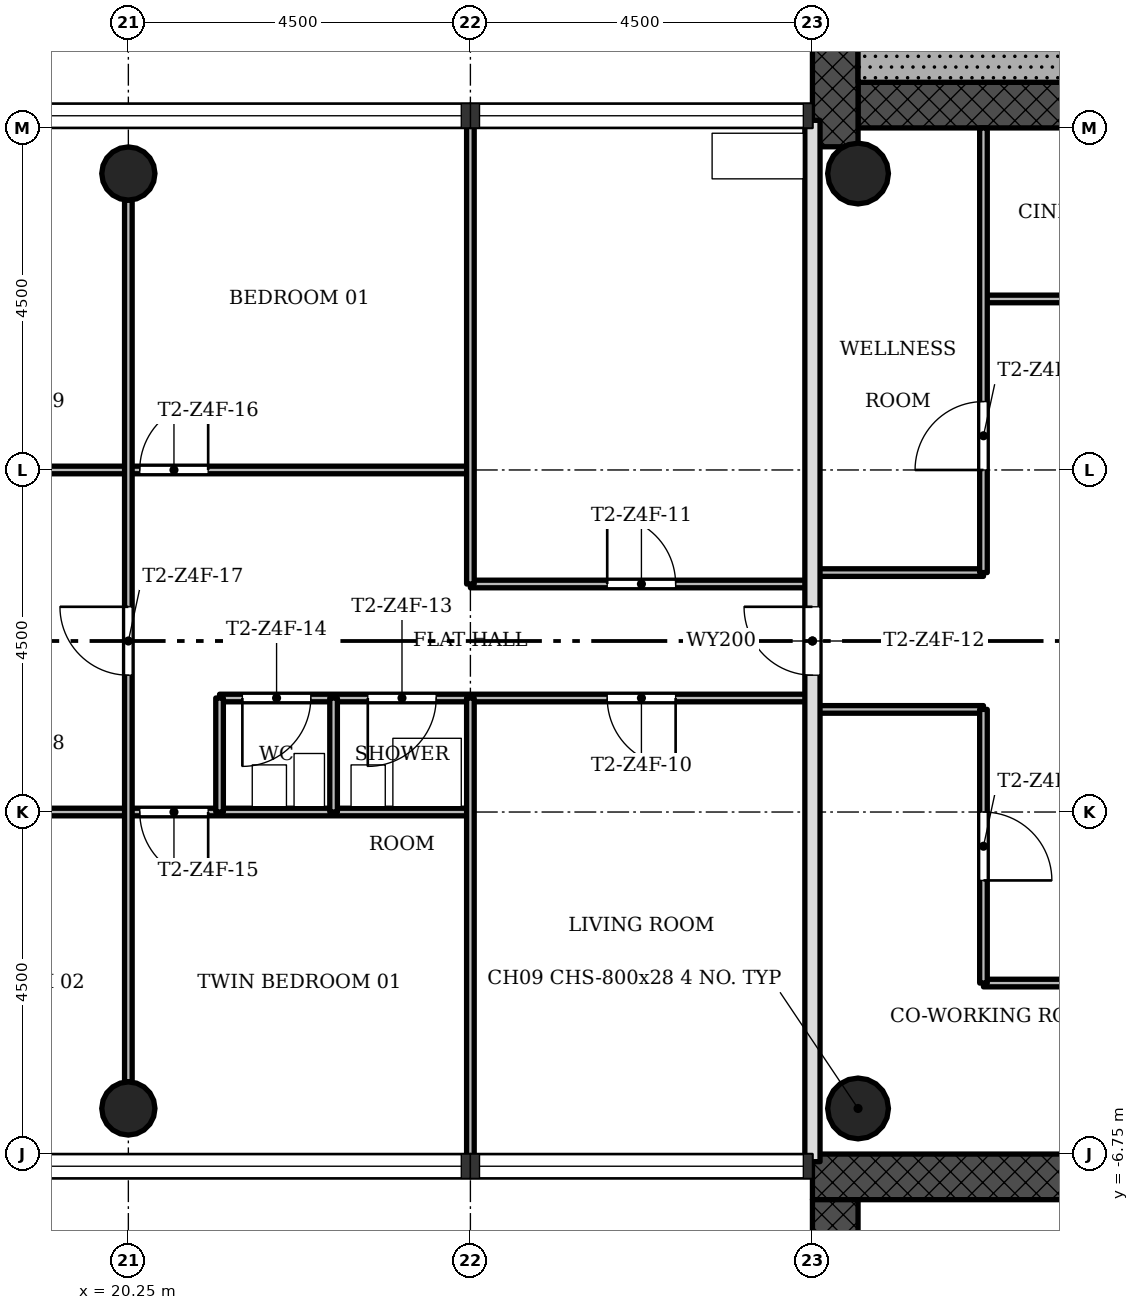
"""IFC4 building model, lengths in metres.
Left out: names, types, materials, properties, quantities, classifications, styles, units other than length and angle.
Written with IfcOpenShell. Run it as: python <this file> out.ifc"""

import sys

from ifc_helpers import new_model, si_unit, direction, frame, frame_2d, origin, origin_2d, place, context, subcontext, project, spatial, rectangle, hollow_circle, extrude, element, fill, save


model = new_model("IFC4")
c1 = context("Model", 3, precision=1e-05, world=origin(), true_north=direction((0.0, 1.0)))
c2 = subcontext(c1, "Body", "Model", "MODEL_VIEW")
j1 = project(units=[si_unit("LENGTHUNIT", "METRE"), si_unit("PLANEANGLEUNIT", "RADIAN")], contexts=[c1])
p1 = place(None, origin())
s1 = spatial("IfcSite", under=j1, at=p1, CompositionType="ELEMENT")
p2 = place(p1, origin())
s2 = spatial("IfcBuilding", under=s1, at=p2, CompositionType="ELEMENT")
p3 = place(p2, frame((0.0, 0.0, 223.2)))
s3 = spatial("IfcBuildingStorey", under=s2, at=p3, CompositionType="ELEMENT", Elevation=223.2)
p4 = place(p3, frame((29.85, 7.05, 0.0), z_axis=(0.0, 0.0, 1.0), x_axis=(1.0, 0.0, 0.0)))
e1 = element("IfcWall", 1, at=p4, inside=s3, PredefinedType="SHEAR", context=c2, shape_type="SweptSolid", body=[
    extrude(rectangle(XDim=12.9, YDim=0.6, at=frame_2d((6.45, 0.0))), origin(), (0.0, 0.0, 1.0), 3.4),
])
p5 = place(p4, frame((5.25, 0.0, 0.0)))
e2 = element("IfcOpeningElement", 2, at=p5, cuts=e1, PredefinedType="OPENING", context=c2, shape_type="SweptSolid", body=[
    extrude(rectangle(XDim=1.8, YDim=2.1, at=frame_2d((0.9, 1.05))), frame((0.0, 0.31, 0.0), z_axis=(0.0, -1.0, 0.0), x_axis=(1.0, 0.0, 0.0)), (0.0, 0.0, 1.0), 0.62),
])
p6 = place(p3, frame((29.55, 15.15, 0.0), z_axis=(0.0, 0.0, 1.0), x_axis=(0.0, -1.0, 0.0)))
e3 = element("IfcWall", 3, at=p6, inside=s3, PredefinedType="SHEAR", context=c2, shape_type="SweptSolid", body=[
    extrude(rectangle(XDim=8.648, YDim=0.6, at=frame_2d((4.324, 0.0))), origin(), (0.0, 0.0, 1.0), 3.4),
])
p7 = place(p3, frame((42.15, -7.05, 0.0), z_axis=(0.0, 0.0, 1.0), x_axis=(-1.0, 0.0, 0.0)))
e4 = element("IfcWall", 4, at=p7, inside=s3, PredefinedType="SHEAR", context=c2, shape_type="SweptSolid", body=[
    extrude(rectangle(XDim=12.9, YDim=0.6, at=frame_2d((6.45, 0.0))), origin(), (0.0, 0.0, 1.0), 3.4),
])
p8 = place(p7, frame((5.25, 0.0, 0.0)))
e5 = element("IfcOpeningElement", 5, at=p8, cuts=e4, PredefinedType="OPENING", context=c2, shape_type="SweptSolid", body=[
    extrude(rectangle(XDim=1.8, YDim=2.1, at=frame_2d((0.9, 1.05))), frame((0.0, 0.31, 0.0), z_axis=(0.0, -1.0, 0.0), x_axis=(1.0, 0.0, 0.0)), (0.0, 0.0, 1.0), 0.62),
])
p9 = place(p3, frame((29.55, -7.35, 0.0), z_axis=(0.0, 0.0, 1.0), x_axis=(0.0, -1.0, 0.0)))
e6 = element("IfcWall", 6, at=p9, inside=s3, PredefinedType="SHEAR", context=c2, shape_type="SweptSolid", body=[
    extrude(rectangle(XDim=8.4, YDim=0.6, at=frame_2d((4.2, 0.0))), origin(), (0.0, 0.0, 1.0), 3.4),
])
for number, where, z_axis, x_axis in (
    (7, (20.25, 6.15, 0.0), (0.0, 0.0, 1.0), (1.0, 0.0, 0.0)),
    (8, (20.25, -6.15, 0.0), (0.0, 0.0, 1.0), (1.0, 0.0, 0.0)),
):
    element("IfcColumn", number, at=place(p3, frame(where, z_axis=z_axis, x_axis=x_axis)), inside=s3, PredefinedType="COLUMN", context=c2, shape_type="SweptSolid", body=[
        extrude(hollow_circle(Radius=0.35, WallThickness=0.025, at=origin_2d()), origin(), (0.0, 0.0, 1.0), 3.4),
    ])
for number, where, z_axis, x_axis in (
    (9, (29.85, 6.15, 0.0), (0.0, 0.0, 1.0), (1.0, 0.0, 0.0)),
    (10, (29.85, -6.15, 0.0), (0.0, 0.0, 1.0), (1.0, 0.0, 0.0)),
):
    element("IfcColumn", number, at=place(p3, frame(where, z_axis=z_axis, x_axis=x_axis)), inside=s3, PredefinedType="COLUMN", context=c2, shape_type="SweptSolid", body=[
        extrude(hollow_circle(Radius=0.4, WallThickness=0.028, at=origin_2d()), origin(), (0.0, 0.0, 1.0), 3.4),
    ])
p10 = place(p3, frame((34.5, -4.5, 0.0), z_axis=(0.0, 0.0, 1.0), x_axis=(-1.0, 0.0, 0.0)))
e11 = element("IfcWall", 11, at=p10, inside=s3, PredefinedType="PARTITIONING", context=c2, shape_type="SweptSolid", body=[
    extrude(rectangle(XDim=3.0, YDim=0.1, at=frame_2d((1.5, 0.0))), origin(), (0.0, 0.0, 1.0), 3.0),
])
p11 = place(p3, frame((24.75, -2.25, 0.0), z_axis=(0.0, 0.0, 1.0), x_axis=(-1.0, 0.0, 0.0)))
e12 = element("IfcWall", 12, at=p11, inside=s3, PredefinedType="PARTITIONING", context=c2, shape_type="SweptSolid", body=[
    extrude(rectangle(XDim=9.1, YDim=0.1, at=frame_2d((4.55, 0.0))), origin(), (0.0, 0.0, 1.0), 3.0),
])
p12 = place(p11, frame((3.45, 0.0, 0.0)))
e13 = element("IfcOpeningElement", 13, at=p12, cuts=e12, PredefinedType="OPENING", context=c2, shape_type="SweptSolid", body=[
    extrude(rectangle(XDim=0.9, YDim=2.1, at=frame_2d((0.45, 1.05))), frame((0.0, 0.06, 0.0), z_axis=(0.0, -1.0, 0.0), x_axis=(1.0, 0.0, 0.0)), (0.0, 0.0, 1.0), 0.12),
])
p13 = place(p11, frame((5.55, 0.0, 0.0)))
e14 = element("IfcOpeningElement", 14, at=p13, cuts=e12, PredefinedType="OPENING", context=c2, shape_type="SweptSolid", body=[
    extrude(rectangle(XDim=0.9, YDim=2.1, at=frame_2d((0.45, 1.05))), frame((0.0, 0.06, 0.0), z_axis=(0.0, -1.0, 0.0), x_axis=(1.0, 0.0, 0.0)), (0.0, 0.0, 1.0), 0.12),
])
p14 = place(p3, frame((31.5, -0.9, 0.0), z_axis=(0.0, 0.0, 1.0), x_axis=(-1.0, 0.0, 0.0)))
e15 = element("IfcWall", 15, at=p14, inside=s3, PredefinedType="PARTITIONING", context=c2, shape_type="SweptSolid", body=[
    extrude(rectangle(XDim=2.25, YDim=0.1, at=frame_2d((1.125, 0.0))), origin(), (0.0, 0.0, 1.0), 3.0),
])
p15 = place(p3, frame((29.25, -0.75, 0.0), z_axis=(0.0, 0.0, 1.0), x_axis=(-1.0, 0.0, 0.0)))
e16 = element("IfcWall", 16, at=p15, inside=s3, PredefinedType="PARTITIONING", context=c2, shape_type="SweptSolid", body=[
    extrude(rectangle(XDim=7.8, YDim=0.1, at=frame_2d((3.9, 0.0))), origin(), (0.0, 0.0, 1.0), 3.0),
])
p16 = place(p15, frame((1.8, 0.0, 0.0)))
e17 = element("IfcOpeningElement", 17, at=p16, cuts=e16, PredefinedType="OPENING", context=c2, shape_type="SweptSolid", body=[
    extrude(rectangle(XDim=0.9, YDim=2.1, at=frame_2d((0.45, 1.05))), frame((0.0, 0.06, 0.0), z_axis=(0.0, -1.0, 0.0), x_axis=(1.0, 0.0, 0.0)), (0.0, 0.0, 1.0), 0.12),
])
p17 = place(p15, frame((4.95, 0.0, 0.0)))
e18 = element("IfcOpeningElement", 18, at=p17, cuts=e16, PredefinedType="OPENING", context=c2, shape_type="SweptSolid", body=[
    extrude(rectangle(XDim=0.9, YDim=2.1, at=frame_2d((0.45, 1.05))), frame((0.0, 0.06, 0.0), z_axis=(0.0, -1.0, 0.0), x_axis=(1.0, 0.0, 0.0)), (0.0, 0.0, 1.0), 0.12),
])
p18 = place(p15, frame((6.6, 0.0, 0.0)))
e19 = element("IfcOpeningElement", 19, at=p18, cuts=e16, PredefinedType="OPENING", context=c2, shape_type="SweptSolid", body=[
    extrude(rectangle(XDim=0.9, YDim=2.1, at=frame_2d((0.45, 1.05))), frame((0.0, 0.06, 0.0), z_axis=(0.0, -1.0, 0.0), x_axis=(1.0, 0.0, 0.0)), (0.0, 0.0, 1.0), 0.12),
])
p19 = place(p3, frame((29.25, 0.75, 0.0), z_axis=(0.0, 0.0, 1.0), x_axis=(-1.0, 0.0, 0.0)))
e20 = element("IfcWall", 20, at=p19, inside=s3, PredefinedType="PARTITIONING", context=c2, shape_type="SweptSolid", body=[
    extrude(rectangle(XDim=4.5, YDim=0.1, at=frame_2d((2.25, 0.0))), origin(), (0.0, 0.0, 1.0), 3.0),
])
p20 = place(p19, frame((1.8, 0.0, 0.0)))
e21 = element("IfcOpeningElement", 21, at=p20, cuts=e20, PredefinedType="OPENING", context=c2, shape_type="SweptSolid", body=[
    extrude(rectangle(XDim=0.9, YDim=2.1, at=frame_2d((0.45, 1.05))), frame((0.0, 0.06, 0.0), z_axis=(0.0, -1.0, 0.0), x_axis=(1.0, 0.0, 0.0)), (0.0, 0.0, 1.0), 0.12),
])
p21 = place(p3, frame((31.5, 0.9, 0.0), z_axis=(0.0, 0.0, 1.0), x_axis=(-1.0, 0.0, 0.0)))
e22 = element("IfcWall", 22, at=p21, inside=s3, PredefinedType="PARTITIONING", context=c2, shape_type="SweptSolid", body=[
    extrude(rectangle(XDim=2.25, YDim=0.1, at=frame_2d((1.125, 0.0))), origin(), (0.0, 0.0, 1.0), 3.0),
])
p22 = place(p3, frame((24.75, 2.25, 0.0), z_axis=(0.0, 0.0, 1.0), x_axis=(-1.0, 0.0, 0.0)))
e23 = element("IfcWall", 23, at=p22, inside=s3, PredefinedType="PARTITIONING", context=c2, shape_type="SweptSolid", body=[
    extrude(rectangle(XDim=9.1, YDim=0.1, at=frame_2d((4.55, 0.0))), origin(), (0.0, 0.0, 1.0), 3.0),
])
p23 = place(p22, frame((3.45, 0.0, 0.0)))
e24 = element("IfcOpeningElement", 24, at=p23, cuts=e23, PredefinedType="OPENING", context=c2, shape_type="SweptSolid", body=[
    extrude(rectangle(XDim=0.9, YDim=2.1, at=frame_2d((0.45, 1.05))), frame((0.0, 0.06, 0.0), z_axis=(0.0, -1.0, 0.0), x_axis=(1.0, 0.0, 0.0)), (0.0, 0.0, 1.0), 0.12),
])
p24 = place(p22, frame((5.55, 0.0, 0.0)))
e25 = element("IfcOpeningElement", 25, at=p24, cuts=e23, PredefinedType="OPENING", context=c2, shape_type="SweptSolid", body=[
    extrude(rectangle(XDim=0.9, YDim=2.1, at=frame_2d((0.45, 1.05))), frame((0.0, 0.06, 0.0), z_axis=(0.0, -1.0, 0.0), x_axis=(1.0, 0.0, 0.0)), (0.0, 0.0, 1.0), 0.12),
])
p25 = place(p3, frame((34.5, 4.5, 0.0), z_axis=(0.0, 0.0, 1.0), x_axis=(-1.0, 0.0, 0.0)))
e26 = element("IfcWall", 26, at=p25, inside=s3, PredefinedType="PARTITIONING", context=c2, shape_type="SweptSolid", body=[
    extrude(rectangle(XDim=3.0, YDim=0.1, at=frame_2d((1.5, 0.0))), origin(), (0.0, 0.0, 1.0), 3.0),
])
p26 = place(p25, frame((1.05, 0.0, 0.0)))
e27 = element("IfcOpeningElement", 27, at=p26, cuts=e26, PredefinedType="OPENING", context=c2, shape_type="SweptSolid", body=[
    extrude(rectangle(XDim=0.9, YDim=2.1, at=frame_2d((0.45, 1.05))), frame((0.0, 0.06, 0.0), z_axis=(0.0, -1.0, 0.0), x_axis=(1.0, 0.0, 0.0)), (0.0, 0.0, 1.0), 0.12),
])
p27 = place(p3, frame((31.5, -4.5, 0.0), z_axis=(0.0, 0.0, 1.0), x_axis=(0.0, 1.0, 0.0)))
e28 = element("IfcWall", 28, at=p27, inside=s3, PredefinedType="PARTITIONING", context=c2, shape_type="SweptSolid", body=[
    extrude(rectangle(XDim=3.6, YDim=0.1, at=frame_2d((1.8, 0.0))), origin(), (0.0, 0.0, 1.0), 3.0),
])
p28 = place(p27, frame((1.35, 0.0, 0.0)))
e29 = element("IfcOpeningElement", 29, at=p28, cuts=e28, PredefinedType="OPENING", context=c2, shape_type="SweptSolid", body=[
    extrude(rectangle(XDim=0.9, YDim=2.1, at=frame_2d((0.45, 1.05))), frame((0.0, 0.06, 0.0), z_axis=(0.0, -1.0, 0.0), x_axis=(1.0, 0.0, 0.0)), (0.0, 0.0, 1.0), 0.12),
])
p29 = place(p3, frame((31.5, 0.9, 0.0), z_axis=(0.0, 0.0, 1.0), x_axis=(0.0, 1.0, 0.0)))
e30 = element("IfcWall", 30, at=p29, inside=s3, PredefinedType="PARTITIONING", context=c2, shape_type="SweptSolid", body=[
    extrude(rectangle(XDim=5.85, YDim=0.1, at=frame_2d((2.925, 0.0))), origin(), (0.0, 0.0, 1.0), 3.0),
])
p30 = place(p29, frame((1.35, 0.0, 0.0)))
e31 = element("IfcOpeningElement", 31, at=p30, cuts=e30, PredefinedType="OPENING", context=c2, shape_type="SweptSolid", body=[
    extrude(rectangle(XDim=0.9, YDim=2.1, at=frame_2d((0.45, 1.05))), frame((0.0, 0.06, 0.0), z_axis=(0.0, -1.0, 0.0), x_axis=(1.0, 0.0, 0.0)), (0.0, 0.0, 1.0), 0.12),
])
p31 = place(p3, frame((29.25, -6.85, 0.0), z_axis=(0.0, 0.0, 1.0), x_axis=(0.0, 1.0, 0.0)))
e32 = element("IfcWall", 32, at=p31, inside=s3, PredefinedType="SOLIDWALL", context=c2, shape_type="SweptSolid", body=[
    extrude(rectangle(XDim=13.7, YDim=0.2, at=frame_2d((6.85, 0.0))), origin(), (0.0, 0.0, 1.0), 3.0),
])
p32 = place(p31, frame((6.4, 0.0, 0.0)))
e33 = element("IfcOpeningElement", 33, at=p32, cuts=e32, PredefinedType="OPENING", context=c2, shape_type="SweptSolid", body=[
    extrude(rectangle(XDim=0.9, YDim=2.1, at=frame_2d((0.45, 1.05))), frame((0.0, 0.11, 0.0), z_axis=(0.0, -1.0, 0.0), x_axis=(1.0, 0.0, 0.0)), (0.0, 0.0, 1.0), 0.22),
])
for number, where, z_axis, x_axis in (
    (34, (24.75, -6.85, 0.0), (0.0, 0.0, 1.0), (0.0, 1.0, 0.0)),
    (35, (24.75, 0.75, 0.0), (0.0, 0.0, 1.0), (0.0, 1.0, 0.0)),
):
    element("IfcWall", number, at=place(p3, frame(where, z_axis=z_axis, x_axis=x_axis)), inside=s3, PredefinedType="PARTITIONING", context=c2, shape_type="SweptSolid", body=[
        extrude(rectangle(XDim=6.1, YDim=0.1, at=frame_2d((3.05, 0.0))), origin(), (0.0, 0.0, 1.0), 3.0),
    ])
for number, where, z_axis, x_axis in (
    (36, (22.95, -2.25, 0.0), (0.0, 0.0, 1.0), (0.0, 1.0, 0.0)),
    (37, (21.45, -2.25, 0.0), (0.0, 0.0, 1.0), (0.0, 1.0, 0.0)),
):
    element("IfcWall", number, at=place(p3, frame(where, z_axis=z_axis, x_axis=x_axis)), inside=s3, PredefinedType="PARTITIONING", context=c2, shape_type="SweptSolid", body=[
        extrude(rectangle(XDim=1.5, YDim=0.1, at=frame_2d((0.75, 0.0))), origin(), (0.0, 0.0, 1.0), 3.0),
    ])
p33 = place(p3, frame((20.25, -5.8, 0.0), z_axis=(0.0, 0.0, 1.0), x_axis=(0.0, 1.0, 0.0)))
e38 = element("IfcWall", 38, at=p33, inside=s3, PredefinedType="PARTITIONING", context=c2, shape_type="SweptSolid", body=[
    extrude(rectangle(XDim=11.6, YDim=0.1, at=frame_2d((5.8, 0.0))), origin(), (0.0, 0.0, 1.0), 3.0),
])
p34 = place(p33, frame((5.35, 0.0, 0.0)))
e39 = element("IfcOpeningElement", 39, at=p34, cuts=e38, PredefinedType="OPENING", context=c2, shape_type="SweptSolid", body=[
    extrude(rectangle(XDim=0.9, YDim=2.1, at=frame_2d((0.45, 1.05))), frame((0.0, 0.06, 0.0), z_axis=(0.0, -1.0, 0.0), x_axis=(1.0, 0.0, 0.0)), (0.0, 0.0, 1.0), 0.12),
])
p35 = place(p3, frame((34.15, 7.65, 0.0), z_axis=(0.0, 0.0, 1.0), x_axis=(-1.0, 0.0, 0.0)))
e40 = element("IfcWall", 40, at=p35, inside=s3, PredefinedType="SHEAR", context=c2, shape_type="SweptSolid", body=[
    extrude(rectangle(XDim=4.3, YDim=0.6, at=frame_2d((2.15, 0.0))), origin(), (0.0, 0.0, 1.0), 3.4),
])
p36 = place(p30, origin())
e41 = element("IfcDoor", 41, at=p36, inside=s3, OperationType="SINGLE_SWING_RIGHT", PredefinedType="DOOR", context=c2, shape_type="SweptSolid", body=[
    extrude(rectangle(XDim=0.9, YDim=2.1, at=frame_2d((0.45, 1.05))), frame((0.0, 0.025, 0.0), z_axis=(0.0, -1.0, 0.0), x_axis=(1.0, 0.0, 0.0)), (0.0, 0.0, 1.0), 0.05),
])
fill(e31, e41)
p37 = place(p28, origin())
e42 = element("IfcDoor", 42, at=p37, inside=s3, OperationType="SINGLE_SWING_LEFT", PredefinedType="DOOR", context=c2, shape_type="SweptSolid", body=[
    extrude(rectangle(XDim=0.9, YDim=2.1, at=frame_2d((0.45, 1.05))), frame((0.0, 0.025, 0.0), z_axis=(0.0, -1.0, 0.0), x_axis=(1.0, 0.0, 0.0)), (0.0, 0.0, 1.0), 0.05),
])
fill(e29, e42)
p38 = place(p16, origin())
e43 = element("IfcDoor", 43, at=p38, inside=s3, OperationType="SINGLE_SWING_RIGHT", PredefinedType="DOOR", context=c2, shape_type="SweptSolid", body=[
    extrude(rectangle(XDim=0.9, YDim=2.1, at=frame_2d((0.45, 1.05))), frame((0.0, 0.025, 0.0), z_axis=(0.0, -1.0, 0.0), x_axis=(1.0, 0.0, 0.0)), (0.0, 0.0, 1.0), 0.05),
])
fill(e17, e43)
p39 = place(p20, origin())
e44 = element("IfcDoor", 44, at=p39, inside=s3, OperationType="SINGLE_SWING_RIGHT", PredefinedType="DOOR", context=c2, shape_type="SweptSolid", body=[
    extrude(rectangle(XDim=0.9, YDim=2.1, at=frame_2d((0.45, 1.05))), frame((0.0, 0.025, 0.0), z_axis=(0.0, -1.0, 0.0), x_axis=(1.0, 0.0, 0.0)), (0.0, 0.0, 1.0), 0.05),
])
fill(e21, e44)
p40 = place(p32, origin())
e45 = element("IfcDoor", 45, at=p40, inside=s3, OperationType="SINGLE_SWING_LEFT", PredefinedType="DOOR", context=c2, shape_type="SweptSolid", body=[
    extrude(rectangle(XDim=0.9, YDim=2.1, at=frame_2d((0.45, 1.05))), frame((0.0, 0.025, 0.0), z_axis=(0.0, -1.0, 0.0), x_axis=(1.0, 0.0, 0.0)), (0.0, 0.0, 1.0), 0.05),
])
fill(e33, e45)
p41 = place(p17, origin())
e46 = element("IfcDoor", 46, at=p41, inside=s3, OperationType="SINGLE_SWING_LEFT", PredefinedType="DOOR", context=c2, shape_type="SweptSolid", body=[
    extrude(rectangle(XDim=0.9, YDim=2.1, at=frame_2d((0.45, 1.05))), frame((0.0, 0.025, 0.0), z_axis=(0.0, -1.0, 0.0), x_axis=(1.0, 0.0, 0.0)), (0.0, 0.0, 1.0), 0.05),
])
fill(e18, e46)
p42 = place(p18, origin())
e47 = element("IfcDoor", 47, at=p42, inside=s3, OperationType="SINGLE_SWING_LEFT", PredefinedType="DOOR", context=c2, shape_type="SweptSolid", body=[
    extrude(rectangle(XDim=0.9, YDim=2.1, at=frame_2d((0.45, 1.05))), frame((0.0, 0.025, 0.0), z_axis=(0.0, -1.0, 0.0), x_axis=(1.0, 0.0, 0.0)), (0.0, 0.0, 1.0), 0.05),
])
fill(e19, e47)
p43 = place(p12, origin())
e48 = element("IfcDoor", 48, at=p43, inside=s3, OperationType="SINGLE_SWING_RIGHT", PredefinedType="DOOR", context=c2, shape_type="SweptSolid", body=[
    extrude(rectangle(XDim=0.9, YDim=2.1, at=frame_2d((0.45, 1.05))), frame((0.0, 0.025, 0.0), z_axis=(0.0, -1.0, 0.0), x_axis=(1.0, 0.0, 0.0)), (0.0, 0.0, 1.0), 0.05),
])
fill(e13, e48)
p44 = place(p23, origin())
e49 = element("IfcDoor", 49, at=p44, inside=s3, OperationType="SINGLE_SWING_LEFT", PredefinedType="DOOR", context=c2, shape_type="SweptSolid", body=[
    extrude(rectangle(XDim=0.9, YDim=2.1, at=frame_2d((0.45, 1.05))), frame((0.0, 0.025, 0.0), z_axis=(0.0, -1.0, 0.0), x_axis=(1.0, 0.0, 0.0)), (0.0, 0.0, 1.0), 0.05),
])
fill(e24, e49)
p45 = place(p34, origin())
e50 = element("IfcDoor", 50, at=p45, inside=s3, OperationType="SINGLE_SWING_LEFT", PredefinedType="DOOR", context=c2, shape_type="SweptSolid", body=[
    extrude(rectangle(XDim=0.9, YDim=2.1, at=frame_2d((0.45, 1.05))), frame((0.0, 0.025, 0.0), z_axis=(0.0, -1.0, 0.0), x_axis=(1.0, 0.0, 0.0)), (0.0, 0.0, 1.0), 0.05),
])
fill(e39, e50)
save(model, sys.argv[1])
